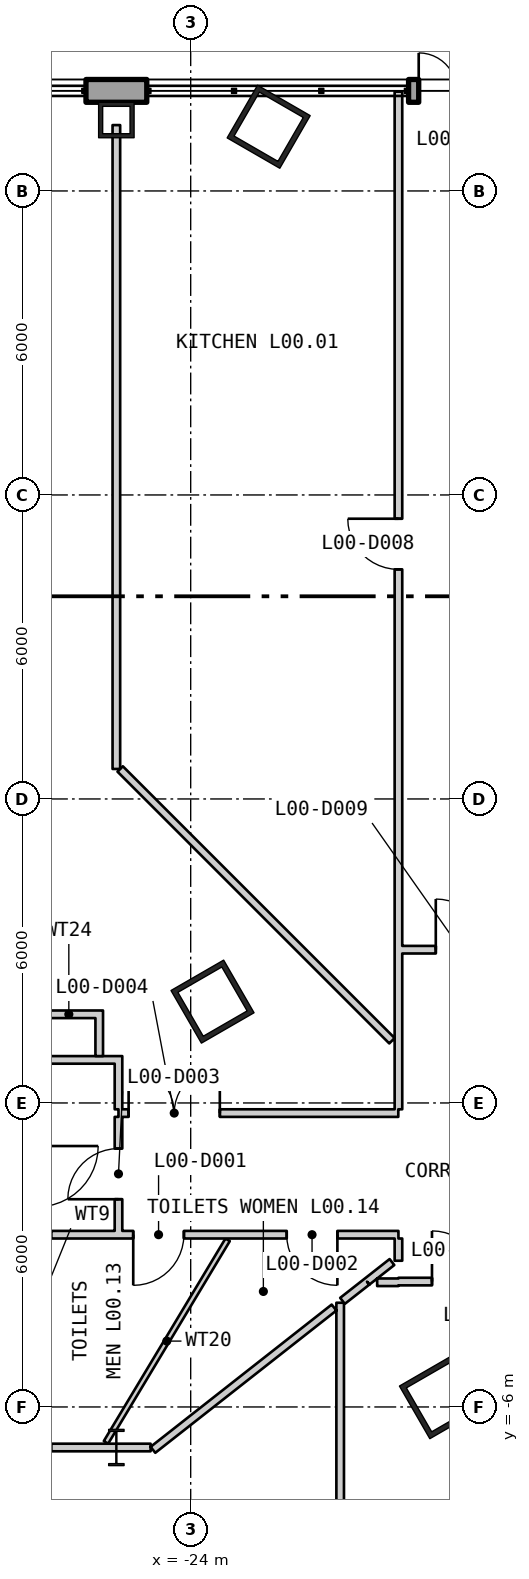
"""IFC4 building model, lengths in metres.
Left out: names, types, materials, properties, quantities, classifications, styles, units other than length and angle.
Written with IfcOpenShell. Run it as: python <this file> out.ifc"""

import sys

from ifc_helpers import new_model, si_unit, direction, frame, frame_2d, origin, origin_2d, place, context, subcontext, project, spatial, polyline, rectangle, hollow_rectangle, i_section, outline, extrude, element, fill, save


model = new_model("IFC4")
c1 = context("Model", 3, precision=1e-05, world=origin(), true_north=direction((0.0, 1.0)))
c2 = subcontext(c1, "Body", "Model", "MODEL_VIEW")
j1 = project(units=[si_unit("LENGTHUNIT", "METRE"), si_unit("PLANEANGLEUNIT", "RADIAN")], contexts=[c1])
p1 = place(None, origin())
s1 = spatial("IfcSite", under=j1, at=p1, CompositionType="ELEMENT")
p2 = place(p1, origin())
s2 = spatial("IfcBuilding", under=s1, at=p2, CompositionType="ELEMENT")
p3 = place(p2, origin())
s3 = spatial("IfcBuildingStorey", under=s2, at=p3, CompositionType="ELEMENT", Elevation=0.0)
for number, where, z_axis, x_axis in (
    (1, (-22.461, 19.267, 0.0), (0.0, 0.0, 1.0), (-0.5, -0.866, 0.0)),
    (2, (-23.569, 2.0, 0.0), (0.0, 0.0, 1.0), (0.5, -0.866, 0.0)),
    (3, (-19.061, -5.807, 0.0), (0.0, 0.0, 1.0), (0.5, -0.866, 0.0)),
):
    element("IfcColumn", number, at=place(p3, frame(where, z_axis=z_axis, x_axis=x_axis)), inside=s3, PredefinedType="COLUMN", context=c2, shape_type="SweptSolid", body=[
        extrude(hollow_rectangle(XDim=1.2, YDim=1.2, WallThickness=0.1, at=origin_2d()), origin(), (0.0, 0.0, 1.0), 8.4),
    ])
p4 = place(p3, frame((-25.467, 19.4, 0.0), z_axis=(0.0, 0.0, 1.0), x_axis=(-1.0, 0.0, 0.0)))
e4 = element("IfcColumn", 4, at=p4, inside=s3, PredefinedType="COLUMN", context=c2, shape_type="SweptSolid", body=[
    extrude(hollow_rectangle(XDim=0.7, YDim=0.7, WallThickness=0.08, at=origin_2d()), origin(), (0.0, 0.0, 1.0), 8.4),
])
p5 = place(p3, frame((-25.467, -6.8, 0.0), z_axis=(0.0, 0.0, 1.0), x_axis=(1.0, 0.0, 0.0)))
e5 = element("IfcColumn", 5, at=p5, inside=s3, PredefinedType="COLUMN", context=c2, shape_type="SweptSolid", body=[
    extrude(i_section(OverallWidth=0.304, OverallDepth=0.716, WebThickness=0.021, FlangeThickness=0.04, at=origin_2d()), origin(), (0.0, 0.0, 1.0), 8.4),
])
p6 = place(p3, frame((38.775, 19.975, 5.4), z_axis=(0.0, 0.0, 1.0), x_axis=(-1.0, 0.0, 0.0)))
e6 = element("IfcWall", 6, at=p6, inside=s3, PredefinedType="SOLIDWALL", context=c2, shape_type="SweptSolid", body=[
    extrude(outline(polyline([(-0.225, -0.225), (77.775, -0.225), (77.325, 0.225), (0.225, 0.225), (-0.225, -0.225)])), origin(), (0.0, 0.0, 1.0), 2.6),
])
p7 = place(p3, frame((-19.6, 19.975, -0.4), z_axis=(0.0, 0.0, 1.0), x_axis=(-1.0, 0.0, 0.0)))
e7 = element("IfcWall", 7, at=p7, inside=s3, PredefinedType="SOLIDWALL", context=c2, shape_type="SweptSolid", body=[
    extrude(outline(polyline([(0.0, -0.225), (0.1, -0.225), (0.1, 0.225), (0.0, 0.225), (0.0, -0.225)])), origin(), (0.0, 0.0, 1.0), 5.8),
])
p8 = place(p3, frame((-24.867, 19.975, -0.4), z_axis=(0.0, 0.0, 1.0), x_axis=(-1.0, 0.0, 0.0)))
e8 = element("IfcWall", 8, at=p8, inside=s3, PredefinedType="SOLIDWALL", context=c2, shape_type="SweptSolid", body=[
    extrude(outline(polyline([(0.0, -0.225), (1.2, -0.225), (1.2, 0.225), (0.0, 0.225), (0.0, -0.225)])), origin(), (0.0, 0.0, 1.0), 5.8),
])
p9 = place(p3, frame((-13.333, 19.975, -0.4), z_axis=(0.0, 0.0, 1.0), x_axis=(-1.0, 0.0, 0.0)))
e9 = element("IfcWall", 9, at=p9, inside=s3, PredefinedType="SOLIDWALL", context=c2, shape_type="SweptSolid", body=[
    extrude(outline(polyline([(0.0, -0.225), (6.267, -0.225), (6.267, 0.225), (0.0, 0.225), (0.0, -0.225)])), origin(), (0.0, 0.0, 1.0), 5.8),
])
p10 = place(p9, frame((4.667, 0.0, 0.4)))
e10 = element("IfcOpeningElement", 10, at=p10, cuts=e9, PredefinedType="OPENING", context=c2, shape_type="SweptSolid", body=[
    extrude(rectangle(XDim=1.5, YDim=2.4, at=frame_2d((0.75, 1.2))), frame((0.0, 0.235, 0.0), z_axis=(0.0, -1.0, 0.0), x_axis=(1.0, 0.0, 0.0)), (0.0, 0.0, 1.0), 0.47),
])
p11 = place(p3, frame((-19.7, 19.975, -0.4), z_axis=(0.0, 0.0, 1.0), x_axis=(-1.0, 0.0, 0.0)))
e11 = element("IfcWall", 11, at=p11, inside=s3, PredefinedType="SOLIDWALL", context=c2, shape_type="SweptSolid", body=[
    extrude(outline(polyline([(0.0, -0.225), (5.167, -0.225), (5.167, 0.225), (0.0, 0.225), (0.0, -0.225)])), origin(), (0.0, 0.0, 1.0), 1.0),
])
p12 = place(p3, frame((-26.067, 19.975, -0.4), z_axis=(0.0, 0.0, 1.0), x_axis=(-1.0, 0.0, 0.0)))
e12 = element("IfcWall", 12, at=p12, inside=s3, PredefinedType="SOLIDWALL", context=c2, shape_type="SweptSolid", body=[
    extrude(outline(polyline([(0.0, -0.225), (5.167, -0.225), (5.167, 0.225), (0.0, 0.225), (0.0, -0.225)])), origin(), (0.0, 0.0, 1.0), 1.0),
])
p13 = place(p3, frame((-27.08, 1.75, 0.0), z_axis=(0.0, 0.0, 1.0), x_axis=(1.0, 0.0, 0.0)))
e13 = element("IfcWall", 13, at=p13, inside=s3, PredefinedType="PARTITIONING", context=c2, shape_type="SweptSolid", body=[
    extrude(rectangle(XDim=1.35, YDim=0.15, at=frame_2d((0.675, 0.0))), origin(), (0.0, 0.0, 1.0), 8.18),
])
p14 = place(p3, frame((-27.005, 0.85, 0.0), z_axis=(0.0, 0.0, 1.0), x_axis=(1.0, 0.0, 0.0)))
e14 = element("IfcWall", 14, at=p14, inside=s3, PredefinedType="PARTITIONING", context=c2, shape_type="SweptSolid", body=[
    extrude(rectangle(XDim=1.275, YDim=0.15, at=frame_2d((0.637, 0.0))), origin(), (0.0, 0.0, 1.0), 8.18),
])
p15 = place(p3, frame((-26.75, -6.8, 0.0), z_axis=(0.0, 0.0, 1.0), x_axis=(1.0, 0.0, 0.0)))
e15 = element("IfcWall", 15, at=p15, inside=s3, PredefinedType="PARTITIONING", context=c2, shape_type="SweptSolid", body=[
    extrude(rectangle(XDim=1.959, YDim=0.15, at=frame_2d((0.98, 0.0))), origin(), (0.0, 0.0, 1.0), 7.39),
])
p16 = place(p3, frame((-26.75, -2.6, 0.0), z_axis=(0.0, 0.0, 1.0), x_axis=(1.0, 0.0, 0.0)))
e16 = element("IfcWall", 16, at=p16, inside=s3, PredefinedType="PARTITIONING", context=c2, shape_type="SweptSolid", body=[
    extrude(rectangle(XDim=6.85, YDim=0.15, at=frame_2d((3.425, 0.0))), origin(), (0.0, 0.0, 1.0), 8.18),
])
p17 = place(p16, frame((1.616, 0.0, 0.0)))
e17 = element("IfcOpeningElement", 17, at=p17, cuts=e16, PredefinedType="OPENING", context=c2, shape_type="SweptSolid", body=[
    extrude(rectangle(XDim=1.0, YDim=2.1, at=frame_2d((0.5, 1.05))), frame((0.0, 0.085, 0.0), z_axis=(0.0, -1.0, 0.0), x_axis=(1.0, 0.0, 0.0)), (0.0, 0.0, 1.0), 0.17),
])
p18 = place(p16, frame((4.645, 0.0, 0.0)))
e18 = element("IfcOpeningElement", 18, at=p18, cuts=e16, PredefinedType="OPENING", context=c2, shape_type="SweptSolid", body=[
    extrude(rectangle(XDim=1.0, YDim=2.1, at=frame_2d((0.5, 1.05))), frame((0.0, 0.085, 0.0), z_axis=(0.0, -1.0, 0.0), x_axis=(1.0, 0.0, 0.0)), (0.0, 0.0, 1.0), 0.17),
])
p19 = place(p3, frame((-25.805, 0.925, 0.0), z_axis=(0.0, 0.0, 1.0), x_axis=(0.0, 1.0, 0.0)))
e19 = element("IfcWall", 19, at=p19, inside=s3, PredefinedType="PARTITIONING", context=c2, shape_type="SweptSolid", body=[
    extrude(rectangle(XDim=0.75, YDim=0.15, at=frame_2d((0.375, 0.0))), origin(), (0.0, 0.0, 1.0), 8.18),
])
p20 = place(p3, frame((-25.73, 0.85, 0.0), z_axis=(0.0, 0.0, 1.0), x_axis=(1.0, 0.0, 0.0)))
e20 = element("IfcWall", 20, at=p20, inside=s3, PredefinedType="PARTITIONING", context=c2, shape_type="SweptSolid", body=[
    extrude(rectangle(XDim=0.23, YDim=0.15, at=frame_2d((0.115, 0.0))), origin(), (0.0, 0.0, 1.0), 8.18),
])
p21 = place(p3, frame((-25.672, -6.699, 0.0), z_axis=(0.0, 0.0, 1.0), x_axis=(0.5148425828, 0.857284733875, 0.0)))
e21 = element("IfcWall", 21, at=p21, inside=s3, PredefinedType="PARTITIONING", context=c2, shape_type="SweptSolid", body=[
    extrude(rectangle(XDim=4.664, YDim=0.1, at=frame_2d((2.332, 0.0))), origin(), (0.0, 0.0, 1.0), 8.18),
])
p22 = place(p3, frame((-25.467, 6.592, 0.0), z_axis=(0.0, 0.0, 1.0), x_axis=(0.0, 1.0, 0.0)))
e22 = element("IfcWall", 22, at=p22, inside=s3, PredefinedType="PARTITIONING", context=c2, shape_type="SweptSolid", body=[
    extrude(rectangle(XDim=7.736, YDim=0.15, at=frame_2d((3.868, 0.0))), origin(), (0.0, 0.0, 1.0), 8.18),
])
p23 = place(p3, frame((-25.467, 14.328, 0.0), z_axis=(0.0, 0.0, 1.0), x_axis=(0.0, 1.0, 0.0)))
e23 = element("IfcWall", 23, at=p23, inside=s3, PredefinedType="PARTITIONING", context=c2, shape_type="SweptSolid", body=[
    extrude(rectangle(XDim=4.972, YDim=0.15, at=frame_2d((2.486, 0.0))), origin(), (0.0, 0.0, 1.0), 7.58),
])
p24 = place(p3, frame((-25.425, -2.525, 0.0), z_axis=(0.0, 0.0, 1.0), x_axis=(0.0, 1.0, 0.0)))
e24 = element("IfcWall", 24, at=p24, inside=s3, PredefinedType="PARTITIONING", context=c2, shape_type="SweptSolid", body=[
    extrude(rectangle(XDim=2.25, YDim=0.15, at=frame_2d((1.125, 0.0))), origin(), (0.0, 0.0, 1.0), 7.49),
])
p25 = place(p24, frame((0.625, 0.0, 0.0)))
e25 = element("IfcOpeningElement", 25, at=p25, cuts=e24, PredefinedType="OPENING", context=c2, shape_type="SweptSolid", body=[
    extrude(rectangle(XDim=1.0, YDim=2.1, at=frame_2d((0.5, 1.05))), frame((0.0, 0.085, 0.0), z_axis=(0.0, -1.0, 0.0), x_axis=(1.0, 0.0, 0.0)), (0.0, 0.0, 1.0), 0.17),
])
p26 = place(p3, frame((-25.425, -0.2, 0.0), z_axis=(0.0, 0.0, 1.0), x_axis=(1.0, 0.0, 0.0)))
e26 = element("IfcWall", 26, at=p26, inside=s3, PredefinedType="PARTITIONING", context=c2, shape_type="SweptSolid", body=[
    extrude(rectangle(XDim=5.522, YDim=0.15, at=frame_2d((2.761, 0.0))), origin(), (0.0, 0.0, 1.0), 8.18),
])
p27 = place(p26, frame((0.2, 0.0, 0.0)))
e27 = element("IfcOpeningElement", 27, at=p27, cuts=e26, PredefinedType="OPENING", context=c2, shape_type="SweptSolid", body=[
    extrude(rectangle(XDim=1.8, YDim=2.1, at=frame_2d((0.9, 1.05))), frame((0.0, 0.085, 0.0), z_axis=(0.0, -1.0, 0.0), x_axis=(1.0, 0.0, 0.0)), (0.0, 0.0, 1.0), 0.17),
])
p28 = place(p3, frame((-25.425, -0.125, 0.0), z_axis=(0.0, 0.0, 1.0), x_axis=(0.0, 1.0, 0.0)))
e28 = element("IfcWall", 28, at=p28, inside=s3, PredefinedType="PARTITIONING", context=c2, shape_type="SweptSolid", body=[
    extrude(rectangle(XDim=1.05, YDim=0.15, at=frame_2d((0.525, 0.0))), origin(), (0.0, 0.0, 1.0), 7.49),
])
p29 = place(p3, frame((-25.392, 6.592, 0.0), z_axis=(0.0, 0.0, 1.0), x_axis=(0.707106781187, -0.707106781187, 0.0)))
e29 = element("IfcWall", 29, at=p29, inside=s3, PredefinedType="PARTITIONING", context=c2, shape_type="SweptSolid", body=[
    extrude(rectangle(XDim=7.586, YDim=0.15, at=frame_2d((3.793, 0.0))), origin(), (0.0, 0.0, 1.0), 8.18),
])
p30 = place(p3, frame((-24.745, -6.846, 0.0), z_axis=(0.0, 0.0, 1.0), x_axis=(0.786333607762, 0.617802118242, 0.0)))
e30 = element("IfcWall", 30, at=p30, inside=s3, PredefinedType="PARTITIONING", context=c2, shape_type="SweptSolid", body=[
    extrude(rectangle(XDim=4.545, YDim=0.15, at=frame_2d((2.273, 0.0))), origin(), (0.0, 0.0, 1.0), 8.18),
])
p31 = place(p3, frame((-21.05, -14.803, 0.0), z_axis=(0.0, 0.0, 1.0), x_axis=(0.0, 1.0, 0.0)))
e31 = element("IfcWall", 31, at=p31, inside=s3, PredefinedType="PARTITIONING", context=c2, shape_type="SweptSolid", body=[
    extrude(rectangle(XDim=10.86, YDim=0.15, at=frame_2d((5.43, 0.0))), origin(), (0.0, 0.0, 1.0), 8.18),
])
p32 = place(p31, frame((4.392, 0.0, 0.0)))
e32 = element("IfcOpeningElement", 32, at=p32, cuts=e31, PredefinedType="OPENING", context=c2, shape_type="SweptSolid", body=[
    extrude(rectangle(XDim=1.8, YDim=2.1, at=frame_2d((0.9, 1.05))), frame((0.0, 0.085, 0.0), z_axis=(0.0, -1.0, 0.0), x_axis=(1.0, 0.0, 0.0)), (0.0, 0.0, 1.0), 0.17),
])
p33 = place(p3, frame((-21.004, -3.906, 0.0), z_axis=(0.0, 0.0, 1.0), x_axis=(0.786713818429, 0.61731788237, 0.0)))
e33 = element("IfcWall", 33, at=p33, inside=s3, PredefinedType="PARTITIONING", context=c2, shape_type="SweptSolid", body=[
    extrude(rectangle(XDim=0.614, YDim=0.15, at=frame_2d((0.307, 0.0))), origin(), (0.0, 0.0, 1.0), 8.18),
])
p34 = place(p3, frame((-20.521, -3.527, 0.0), z_axis=(0.0, 0.0, 1.0), x_axis=(0.786595086438, 0.617469165216, 0.0)))
e34 = element("IfcWall", 34, at=p34, inside=s3, PredefinedType="PARTITIONING", context=c2, shape_type="SweptSolid", body=[
    extrude(rectangle(XDim=0.627, YDim=0.15, at=frame_2d((0.313, 0.0))), origin(), (0.0, 0.0, 1.0), 8.18),
])
p35 = place(p3, frame((-20.32, -3.539, 0.0), z_axis=(0.0, 0.0, 1.0), x_axis=(1.0, 0.0, 0.0)))
e35 = element("IfcWall", 35, at=p35, inside=s3, PredefinedType="PARTITIONING", context=c2, shape_type="SweptSolid", body=[
    extrude(rectangle(XDim=0.42, YDim=0.15, at=frame_2d((0.21, 0.0))), origin(), (0.0, 0.0, 1.0), 8.18),
])
p36 = place(p3, frame((-19.9, -3.525, 0.0), z_axis=(0.0, 0.0, 1.0), x_axis=(1.0, 0.0, 0.0)))
e36 = element("IfcWall", 36, at=p36, inside=s3, PredefinedType="PARTITIONING", context=c2, shape_type="SweptSolid", body=[
    extrude(rectangle(XDim=2.325, YDim=0.15, at=frame_2d((1.163, 0.0))), origin(), (0.0, 0.0, 1.0), 8.18),
])
p37 = place(p36, frame((0.662, 0.0, 0.0)))
e37 = element("IfcOpeningElement", 37, at=p37, cuts=e36, PredefinedType="OPENING", context=c2, shape_type="SweptSolid", body=[
    extrude(rectangle(XDim=1.0, YDim=2.1, at=frame_2d((0.5, 1.05))), frame((0.0, 0.085, 0.0), z_axis=(0.0, -1.0, 0.0), x_axis=(1.0, 0.0, 0.0)), (0.0, 0.0, 1.0), 0.17),
])
p38 = place(p3, frame((-19.9, -3.114, 0.0), z_axis=(0.0, 0.0, 1.0), x_axis=(0.0, 1.0, 0.0)))
e38 = element("IfcWall", 38, at=p38, inside=s3, PredefinedType="PARTITIONING", context=c2, shape_type="SweptSolid", body=[
    extrude(rectangle(XDim=0.439, YDim=0.15, at=frame_2d((0.22, 0.0))), origin(), (0.0, 0.0, 1.0), 8.18),
])
p39 = place(p3, frame((-19.9, -0.125, 0.0), z_axis=(0.0, 0.0, 1.0), x_axis=(0.0, 1.0, 0.0)))
e39 = element("IfcWall", 39, at=p39, inside=s3, PredefinedType="PARTITIONING", context=c2, shape_type="SweptSolid", body=[
    extrude(rectangle(XDim=1.15, YDim=0.15, at=frame_2d((0.575, 0.0))), origin(), (0.0, 0.0, 1.0), 8.18),
])
p40 = place(p3, frame((-19.9, 1.025, 0.0), z_axis=(0.0, 0.0, 1.0), x_axis=(0.0, 1.0, 0.0)))
e40 = element("IfcWall", 40, at=p40, inside=s3, PredefinedType="PARTITIONING", context=c2, shape_type="SweptSolid", body=[
    extrude(rectangle(XDim=18.935, YDim=0.15, at=frame_2d((9.467, 0.0))), origin(), (0.0, 0.0, 1.0), 8.18),
])
p41 = place(p40, frame((9.506, 0.0, 0.0)))
e41 = element("IfcOpeningElement", 41, at=p41, cuts=e40, PredefinedType="OPENING", context=c2, shape_type="SweptSolid", body=[
    extrude(rectangle(XDim=1.0, YDim=2.1, at=frame_2d((0.5, 1.05))), frame((0.0, 0.085, 0.0), z_axis=(0.0, -1.0, 0.0), x_axis=(1.0, 0.0, 0.0)), (0.0, 0.0, 1.0), 0.17),
])
p42 = place(p3, frame((-19.825, 3.025, 0.0), z_axis=(0.0, 0.0, 1.0), x_axis=(1.0, 0.0, 0.0)))
e42 = element("IfcWall", 42, at=p42, inside=s3, PredefinedType="PARTITIONING", context=c2, shape_type="SweptSolid", body=[
    extrude(rectangle(XDim=2.325, YDim=0.15, at=frame_2d((1.163, 0.0))), origin(), (0.0, 0.0, 1.0), 7.63),
])
p43 = place(p42, frame((0.662, 0.0, 0.0)))
e43 = element("IfcOpeningElement", 43, at=p43, cuts=e42, PredefinedType="OPENING", context=c2, shape_type="SweptSolid", body=[
    extrude(rectangle(XDim=1.0, YDim=2.1, at=frame_2d((0.5, 1.05))), frame((0.0, 0.085, 0.0), z_axis=(0.0, -1.0, 0.0), x_axis=(1.0, 0.0, 0.0)), (0.0, 0.0, 1.0), 0.17),
])
p44 = place(p10, frame((1.5, 0.0, 0.0), z_axis=(0.0, 0.0, 1.0), x_axis=(-1.0, 0.0, 0.0)))
e44 = element("IfcDoor", 44, at=p44, inside=s3, OperationType="DOUBLE_DOOR_SINGLE_SWING", PredefinedType="DOOR", context=c2, shape_type="SweptSolid", body=[
    extrude(rectangle(XDim=1.5, YDim=2.4, at=frame_2d((0.75, 1.2))), frame((0.0, 0.025, 0.0), z_axis=(0.0, -1.0, 0.0), x_axis=(1.0, 0.0, 0.0)), (0.0, 0.0, 1.0), 0.05),
])
fill(e10, e44)
p45 = place(p17, origin())
e45 = element("IfcDoor", 45, at=p45, inside=s3, OperationType="SINGLE_SWING_LEFT", PredefinedType="DOOR", context=c2, shape_type="SweptSolid", body=[
    extrude(rectangle(XDim=1.0, YDim=2.1, at=frame_2d((0.5, 1.05))), frame((0.0, 0.025, 0.0), z_axis=(0.0, -1.0, 0.0), x_axis=(1.0, 0.0, 0.0)), (0.0, 0.0, 1.0), 0.05),
])
fill(e17, e45)
p46 = place(p18, origin())
e46 = element("IfcDoor", 46, at=p46, inside=s3, OperationType="SINGLE_SWING_RIGHT", PredefinedType="DOOR", context=c2, shape_type="SweptSolid", body=[
    extrude(rectangle(XDim=1.0, YDim=2.1, at=frame_2d((0.5, 1.05))), frame((0.0, 0.025, 0.0), z_axis=(0.0, -1.0, 0.0), x_axis=(1.0, 0.0, 0.0)), (0.0, 0.0, 1.0), 0.05),
])
fill(e18, e46)
p47 = place(p25, origin())
e47 = element("IfcDoor", 47, at=p47, inside=s3, OperationType="SINGLE_SWING_RIGHT", PredefinedType="DOOR", context=c2, shape_type="SweptSolid", body=[
    extrude(rectangle(XDim=1.0, YDim=2.1, at=frame_2d((0.5, 1.05))), frame((0.0, 0.025, 0.0), z_axis=(0.0, -1.0, 0.0), x_axis=(1.0, 0.0, 0.0)), (0.0, 0.0, 1.0), 0.05),
])
fill(e25, e47)
p48 = place(p27, origin())
e48 = element("IfcDoor", 48, at=p48, inside=s3, OperationType="DOUBLE_DOOR_SINGLE_SWING", PredefinedType="DOOR", context=c2, shape_type="SweptSolid", body=[
    extrude(rectangle(XDim=1.8, YDim=2.1, at=frame_2d((0.9, 1.05))), frame((0.0, 0.025, 0.0), z_axis=(0.0, -1.0, 0.0), x_axis=(1.0, 0.0, 0.0)), (0.0, 0.0, 1.0), 0.05),
])
fill(e27, e48)
p49 = place(p37, origin())
e49 = element("IfcDoor", 49, at=p49, inside=s3, OperationType="SINGLE_SWING_RIGHT", PredefinedType="DOOR", context=c2, shape_type="SweptSolid", body=[
    extrude(rectangle(XDim=1.0, YDim=2.1, at=frame_2d((0.5, 1.05))), frame((0.0, 0.025, 0.0), z_axis=(0.0, -1.0, 0.0), x_axis=(1.0, 0.0, 0.0)), (0.0, 0.0, 1.0), 0.05),
])
fill(e37, e49)
p50 = place(p41, origin())
e50 = element("IfcDoor", 50, at=p50, inside=s3, OperationType="SINGLE_SWING_LEFT", PredefinedType="DOOR", context=c2, shape_type="SweptSolid", body=[
    extrude(rectangle(XDim=1.0, YDim=2.1, at=frame_2d((0.5, 1.05))), frame((0.0, 0.025, 0.0), z_axis=(0.0, -1.0, 0.0), x_axis=(1.0, 0.0, 0.0)), (0.0, 0.0, 1.0), 0.05),
])
fill(e41, e50)
p51 = place(p43, origin())
e51 = element("IfcDoor", 51, at=p51, inside=s3, OperationType="SINGLE_SWING_RIGHT", PredefinedType="DOOR", context=c2, shape_type="SweptSolid", body=[
    extrude(rectangle(XDim=1.0, YDim=2.1, at=frame_2d((0.5, 1.05))), frame((0.0, 0.025, 0.0), z_axis=(0.0, -1.0, 0.0), x_axis=(1.0, 0.0, 0.0)), (0.0, 0.0, 1.0), 0.05),
])
fill(e43, e51)
save(model, sys.argv[1])
